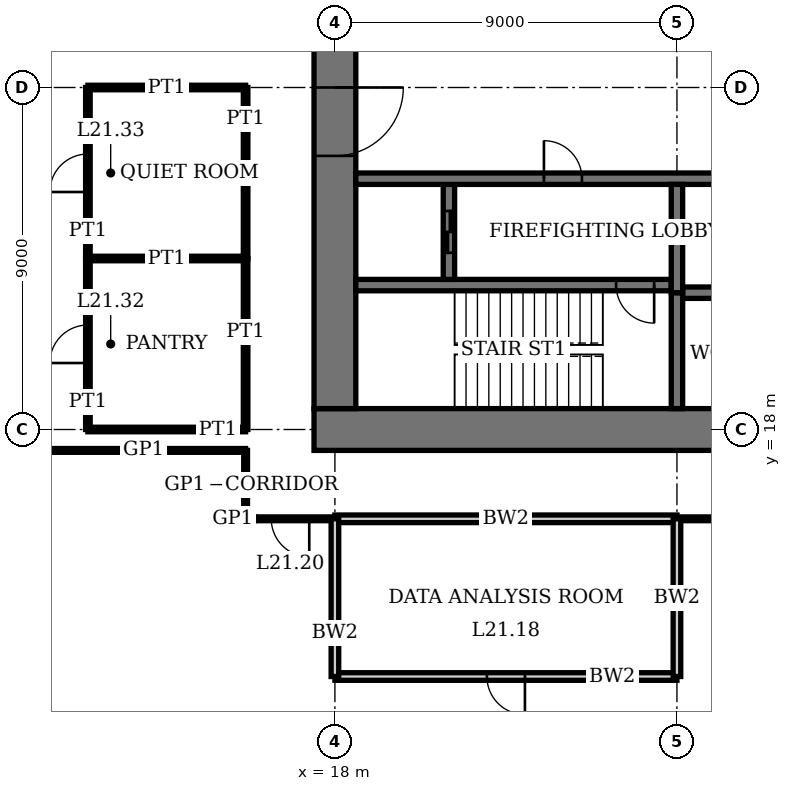
"""IFC4 building model, lengths in metres.
Left out: names, types, materials, properties, quantities, classifications, styles, units other than length and angle.
Written with IfcOpenShell. Run it as: python <this file> out.ifc"""

import sys

from ifc_helpers import new_model, si_unit, direction, frame, frame_2d, origin, place, context, subcontext, project, spatial, rectangle, extrude, element, fill, save


model = new_model("IFC4")
c1 = context("Model", 3, precision=1e-05, world=origin(), true_north=direction((0.0, 1.0)))
c2 = subcontext(c1, "Body", "Model", "MODEL_VIEW")
j1 = project(units=[si_unit("LENGTHUNIT", "METRE"), si_unit("PLANEANGLEUNIT", "RADIAN")], contexts=[c1])
p1 = place(None, origin())
s1 = spatial("IfcSite", under=j1, at=p1, CompositionType="ELEMENT")
p2 = place(p1, origin())
s2 = spatial("IfcBuilding", under=s1, at=p2, CompositionType="ELEMENT")
p3 = place(p2, frame((0.0, 0.0, 89.0)))
s3 = spatial("IfcBuildingStorey", under=s2, at=p3, CompositionType="ELEMENT", Elevation=89.0)
p4 = place(p3, frame((17.45, 18.0, 0.0), z_axis=(0.0, 0.0, 1.0), x_axis=(1.0, 0.0, 0.0)))
e1 = element("IfcWall", 1, at=p4, inside=s3, PredefinedType="SHEAR", context=c2, shape_type="SweptSolid", body=[
    extrude(rectangle(XDim=28.1, YDim=1.1, at=frame_2d((14.05, 0.0))), origin(), (0.0, 0.0, 1.0), 4.0),
])
p5 = place(p4, frame((11.55, 0.0, 0.0)))
e2 = element("IfcOpeningElement", 2, at=p5, cuts=e1, PredefinedType="OPENING", context=c2, shape_type="SweptSolid", body=[
    extrude(rectangle(XDim=1.0, YDim=2.4, at=frame_2d((0.5, 1.2))), frame((0.0, 0.56, 0.0), z_axis=(0.0, -1.0, 0.0), x_axis=(1.0, 0.0, 0.0)), (0.0, 0.0, 1.0), 1.12),
])
p6 = place(p4, frame((16.55, 0.0, 0.0)))
e3 = element("IfcOpeningElement", 3, at=p6, cuts=e1, PredefinedType="OPENING", context=c2, shape_type="SweptSolid", body=[
    extrude(rectangle(XDim=1.0, YDim=2.4, at=frame_2d((0.5, 1.2))), frame((0.0, 0.56, 0.0), z_axis=(0.0, -1.0, 0.0), x_axis=(1.0, 0.0, 0.0)), (0.0, 0.0, 1.0), 1.12),
])
p7 = place(p4, frame((20.0, 0.0, 0.0)))
e4 = element("IfcOpeningElement", 4, at=p7, cuts=e1, PredefinedType="OPENING", context=c2, shape_type="SweptSolid", body=[
    extrude(rectangle(XDim=1.1, YDim=2.4, at=frame_2d((0.55, 1.2))), frame((0.0, 0.56, 0.0), z_axis=(0.0, -1.0, 0.0), x_axis=(1.0, 0.0, 0.0)), (0.0, 0.0, 1.0), 1.12),
])
p8 = place(p4, frame((24.05, 0.0, 0.0)))
e5 = element("IfcOpeningElement", 5, at=p8, cuts=e1, PredefinedType="OPENING", context=c2, shape_type="SweptSolid", body=[
    extrude(rectangle(XDim=1.0, YDim=2.4, at=frame_2d((0.5, 1.2))), frame((0.0, 0.56, 0.0), z_axis=(0.0, -1.0, 0.0), x_axis=(1.0, 0.0, 0.0)), (0.0, 0.0, 1.0), 1.12),
])
p9 = place(p3, frame((18.0, 35.45, 0.0), z_axis=(0.0, 0.0, 1.0), x_axis=(0.0, -1.0, 0.0)))
e6 = element("IfcWall", 6, at=p9, inside=s3, PredefinedType="SHEAR", context=c2, shape_type="SweptSolid", body=[
    extrude(rectangle(XDim=16.9, YDim=1.1, at=frame_2d((8.45, 0.0))), origin(), (0.0, 0.0, 1.0), 4.0),
])
p10 = place(p9, frame((8.45, 0.0, 0.0)))
e7 = element("IfcOpeningElement", 7, at=p10, cuts=e6, PredefinedType="OPENING", context=c2, shape_type="SweptSolid", body=[
    extrude(rectangle(XDim=1.8, YDim=2.4, at=frame_2d((0.9, 1.2))), frame((0.0, 0.56, 0.0), z_axis=(0.0, -1.0, 0.0), x_axis=(1.0, 0.0, 0.0)), (0.0, 0.0, 1.0), 1.12),
])
p11 = place(p3, frame((18.55, 21.8, 0.0), z_axis=(0.0, 0.0, 1.0), x_axis=(1.0, 0.0, 0.0)))
e8 = element("IfcWall", 8, at=p11, inside=s3, PredefinedType="SHEAR", context=c2, shape_type="SweptSolid", body=[
    extrude(rectangle(XDim=8.3, YDim=0.3, at=frame_2d((4.15, 0.0))), origin(), (0.0, 0.0, 1.0), 4.0),
])
p12 = place(p11, frame((6.85, 0.0, 0.0)))
e9 = element("IfcOpeningElement", 9, at=p12, cuts=e8, PredefinedType="OPENING", context=c2, shape_type="SweptSolid", body=[
    extrude(rectangle(XDim=1.0, YDim=2.4, at=frame_2d((0.5, 1.2))), frame((0.0, 0.16, 0.0), z_axis=(0.0, -1.0, 0.0), x_axis=(1.0, 0.0, 0.0)), (0.0, 0.0, 1.0), 0.32),
])
p13 = place(p3, frame((27.0, 18.55, 0.0), z_axis=(0.0, 0.0, 1.0), x_axis=(0.0, 1.0, 0.0)))
e10 = element("IfcWall", 10, at=p13, inside=s3, PredefinedType="SHEAR", context=c2, shape_type="SweptSolid", body=[
    extrude(rectangle(XDim=3.05, YDim=0.3, at=frame_2d((1.525, 0.0))), origin(), (0.0, 0.0, 1.0), 4.0),
])
p14 = place(p3, frame((21.0, 21.95, 0.0), z_axis=(0.0, 0.0, 1.0), x_axis=(0.0, 1.0, 0.0)))
e11 = element("IfcWall", 11, at=p14, inside=s3, PredefinedType="SHEAR", context=c2, shape_type="SweptSolid", body=[
    extrude(rectangle(XDim=2.5, YDim=0.3, at=frame_2d((1.25, 0.0))), origin(), (0.0, 0.0, 1.0), 4.0),
])
p15 = place(p14, frame((0.7, 0.0, 0.0)))
e12 = element("IfcOpeningElement", 12, at=p15, cuts=e11, PredefinedType="OPENING", context=c2, shape_type="SweptSolid", body=[
    extrude(rectangle(XDim=1.1, YDim=2.4, at=frame_2d((0.55, 1.2))), frame((0.0, 0.16, 0.0), z_axis=(0.0, -1.0, 0.0), x_axis=(1.0, 0.0, 0.0)), (0.0, 0.0, 1.0), 0.32),
])
p16 = place(p3, frame((18.55, 24.6, 0.0), z_axis=(0.0, 0.0, 1.0), x_axis=(1.0, 0.0, 0.0)))
e13 = element("IfcWall", 13, at=p16, inside=s3, PredefinedType="SHEAR", context=c2, shape_type="SweptSolid", body=[
    extrude(rectangle(XDim=25.9, YDim=0.3, at=frame_2d((12.95, 0.0))), origin(), (0.0, 0.0, 1.0), 4.0),
])
p17 = place(p16, frame((4.95, 0.0, 0.0)))
e14 = element("IfcOpeningElement", 14, at=p17, cuts=e13, PredefinedType="OPENING", context=c2, shape_type="SweptSolid", body=[
    extrude(rectangle(XDim=1.0, YDim=2.4, at=frame_2d((0.5, 1.2))), frame((0.0, 0.16, 0.0), z_axis=(0.0, -1.0, 0.0), x_axis=(1.0, 0.0, 0.0)), (0.0, 0.0, 1.0), 0.32),
])
p18 = place(p16, frame((24.5, 0.0, 0.0)))
e15 = element("IfcOpeningElement", 15, at=p18, cuts=e13, PredefinedType="OPENING", context=c2, shape_type="SweptSolid", body=[
    extrude(rectangle(XDim=0.9, YDim=2.1, at=frame_2d((0.45, 1.05))), frame((0.0, 0.16, 0.0), z_axis=(0.0, -1.0, 0.0), x_axis=(1.0, 0.0, 0.0)), (0.0, 0.0, 1.0), 0.32),
])
p19 = place(p16, frame((21.3, 0.0, 0.0)))
e16 = element("IfcOpeningElement", 16, at=p19, cuts=e13, PredefinedType="OPENING", context=c2, shape_type="SweptSolid", body=[
    extrude(rectangle(XDim=1.3, YDim=2.4, at=frame_2d((0.65, 1.2))), frame((0.0, 0.16, 0.0), z_axis=(0.0, -1.0, 0.0), x_axis=(1.0, 0.0, 0.0)), (0.0, 0.0, 1.0), 0.32),
])
p20 = place(p3, frame((27.15, 21.6, 0.0), z_axis=(0.0, 0.0, 1.0), x_axis=(1.0, 0.0, 0.0)))
e17 = element("IfcWall", 17, at=p20, inside=s3, PredefinedType="SHEAR", context=c2, shape_type="SweptSolid", body=[
    extrude(rectangle(XDim=17.3, YDim=0.3, at=frame_2d((8.65, 0.0))), origin(), (0.0, 0.0, 1.0), 4.0),
])
p21 = place(p3, frame((27.0, 21.6, 0.0), z_axis=(0.0, 0.0, 1.0), x_axis=(0.0, 1.0, 0.0)))
e18 = element("IfcWall", 18, at=p21, inside=s3, PredefinedType="SHEAR", context=c2, shape_type="SweptSolid", body=[
    extrude(rectangle(XDim=2.85, YDim=0.3, at=frame_2d((1.425, 0.0))), origin(), (0.0, 0.0, 1.0), 4.0),
])
p22 = place(p3, frame((18.0, 11.5, 0.0), z_axis=(0.0, 0.0, 1.0), x_axis=(1.0, 0.0, 0.0)))
e19 = element("IfcWall", 19, at=p22, inside=s3, PredefinedType="SOLIDWALL", context=c2, shape_type="SweptSolid", body=[
    extrude(rectangle(XDim=9.0, YDim=0.2, at=frame_2d((4.5, 0.0))), origin(), (0.0, 0.0, 1.0), 3.75),
])
p23 = place(p22, frame((4.0, 0.0, 0.0)))
e20 = element("IfcOpeningElement", 20, at=p23, cuts=e19, PredefinedType="OPENING", context=c2, shape_type="SweptSolid", body=[
    extrude(rectangle(XDim=1.0, YDim=2.4, at=frame_2d((0.5, 1.2))), frame((0.0, 0.11, 0.0), z_axis=(0.0, -1.0, 0.0), x_axis=(1.0, 0.0, 0.0)), (0.0, 0.0, 1.0), 0.22),
])
p24 = place(p3, frame((18.0, 15.65, 0.0), z_axis=(0.0, 0.0, 1.0), x_axis=(1.0, 0.0, 0.0)))
e21 = element("IfcWall", 21, at=p24, inside=s3, PredefinedType="SOLIDWALL", context=c2, shape_type="SweptSolid", body=[
    extrude(rectangle(XDim=9.0, YDim=0.2, at=frame_2d((4.5, 0.0))), origin(), (0.0, 0.0, 1.0), 3.75),
])
p25 = place(p3, frame((15.65, 15.65, 0.0), z_axis=(0.0, 0.0, 1.0), x_axis=(1.0, 0.0, 0.0)))
e22 = element("IfcWall", 22, at=p25, inside=s3, PredefinedType="PARTITIONING", context=c2, shape_type="SweptSolid", body=[
    extrude(rectangle(XDim=2.35, YDim=0.1, at=frame_2d((1.175, 0.0))), origin(), (0.0, 0.0, 1.0), 3.75),
])
p26 = place(p25, frame((0.675, 0.0, 0.0)))
e23 = element("IfcOpeningElement", 23, at=p26, cuts=e22, PredefinedType="OPENING", context=c2, shape_type="SweptSolid", body=[
    extrude(rectangle(XDim=1.0, YDim=2.4, at=frame_2d((0.5, 1.2))), frame((0.0, 0.06, 0.0), z_axis=(0.0, -1.0, 0.0), x_axis=(1.0, 0.0, 0.0)), (0.0, 0.0, 1.0), 0.12),
])
p27 = place(p3, frame((27.0, 15.65, 0.0), z_axis=(0.0, 0.0, 1.0), x_axis=(1.0, 0.0, 0.0)))
e24 = element("IfcWall", 24, at=p27, inside=s3, PredefinedType="PARTITIONING", context=c2, shape_type="SweptSolid", body=[
    extrude(rectangle(XDim=9.0, YDim=0.1, at=frame_2d((4.5, 0.0))), origin(), (0.0, 0.0, 1.0), 3.75),
])
p28 = place(p27, frame((5.35, 0.0, 0.0)))
e25 = element("IfcOpeningElement", 25, at=p28, cuts=e24, PredefinedType="OPENING", context=c2, shape_type="SweptSolid", body=[
    extrude(rectangle(XDim=1.0, YDim=2.4, at=frame_2d((0.5, 1.2))), frame((0.0, 0.06, 0.0), z_axis=(0.0, -1.0, 0.0), x_axis=(1.0, 0.0, 0.0)), (0.0, 0.0, 1.0), 0.12),
])
p29 = place(p3, frame((10.075, 17.45, 0.0), z_axis=(0.0, 0.0, 1.0), x_axis=(1.0, 0.0, 0.0)))
e26 = element("IfcWall", 26, at=p29, inside=s3, PredefinedType="PARTITIONING", context=c2, shape_type="SweptSolid", body=[
    extrude(rectangle(XDim=5.575, YDim=0.1, at=frame_2d((2.788, 0.0))), origin(), (0.0, 0.0, 1.0), 3.75),
])
p30 = place(p3, frame((11.5, 18.0, 0.0), z_axis=(0.0, 0.0, 1.0), x_axis=(1.0, 0.0, 0.0)))
e27 = element("IfcWall", 27, at=p30, inside=s3, PredefinedType="PARTITIONING", context=c2, shape_type="SweptSolid", body=[
    extrude(rectangle(XDim=4.15, YDim=0.12, at=frame_2d((2.075, 0.0))), origin(), (0.0, 0.0, 1.0), 3.05),
])
p31 = place(p3, frame((11.5, 22.5, 0.0), z_axis=(0.0, 0.0, 1.0), x_axis=(1.0, 0.0, 0.0)))
e28 = element("IfcWall", 28, at=p31, inside=s3, PredefinedType="PARTITIONING", context=c2, shape_type="SweptSolid", body=[
    extrude(rectangle(XDim=4.15, YDim=0.12, at=frame_2d((2.075, 0.0))), origin(), (0.0, 0.0, 1.0), 3.1),
])
p32 = place(p3, frame((11.5, 27.0, 0.0), z_axis=(0.0, 0.0, 1.0), x_axis=(1.0, 0.0, 0.0)))
e29 = element("IfcWall", 29, at=p32, inside=s3, PredefinedType="PARTITIONING", context=c2, shape_type="SweptSolid", body=[
    extrude(rectangle(XDim=4.15, YDim=0.12, at=frame_2d((2.075, 0.0))), origin(), (0.0, 0.0, 1.0), 3.05),
])
p33 = place(p3, frame((11.5, 18.0, 0.0), z_axis=(0.0, 0.0, 1.0), x_axis=(0.0, 1.0, 0.0)))
e30 = element("IfcWall", 30, at=p33, inside=s3, PredefinedType="PARTITIONING", context=c2, shape_type="SweptSolid", body=[
    extrude(rectangle(XDim=4.5, YDim=0.12, at=frame_2d((2.25, 0.0))), origin(), (0.0, 0.0, 1.0), 3.75),
])
p34 = place(p33, frame((1.75, 0.0, 0.0)))
e31 = element("IfcOpeningElement", 31, at=p34, cuts=e30, PredefinedType="OPENING", context=c2, shape_type="SweptSolid", body=[
    extrude(rectangle(XDim=1.0, YDim=2.4, at=frame_2d((0.5, 1.2))), frame((0.0, 0.07, 0.0), z_axis=(0.0, -1.0, 0.0), x_axis=(1.0, 0.0, 0.0)), (0.0, 0.0, 1.0), 0.14),
])
p35 = place(p3, frame((11.5, 22.5, 0.0), z_axis=(0.0, 0.0, 1.0), x_axis=(0.0, 1.0, 0.0)))
e32 = element("IfcWall", 32, at=p35, inside=s3, PredefinedType="PARTITIONING", context=c2, shape_type="SweptSolid", body=[
    extrude(rectangle(XDim=4.5, YDim=0.12, at=frame_2d((2.25, 0.0))), origin(), (0.0, 0.0, 1.0), 3.75),
])
p36 = place(p35, frame((1.75, 0.0, 0.0)))
e33 = element("IfcOpeningElement", 33, at=p36, cuts=e32, PredefinedType="OPENING", context=c2, shape_type="SweptSolid", body=[
    extrude(rectangle(XDim=1.0, YDim=2.4, at=frame_2d((0.5, 1.2))), frame((0.0, 0.07, 0.0), z_axis=(0.0, -1.0, 0.0), x_axis=(1.0, 0.0, 0.0)), (0.0, 0.0, 1.0), 0.14),
])
for number, where, z_axis, x_axis in (
    (34, (15.65, 18.0, 0.0), (0.0, 0.0, 1.0), (0.0, 1.0, 0.0)),
    (35, (15.65, 22.5, 0.0), (0.0, 0.0, 1.0), (0.0, 1.0, 0.0)),
):
    element("IfcWall", number, at=place(p3, frame(where, z_axis=z_axis, x_axis=x_axis)), inside=s3, PredefinedType="PARTITIONING", context=c2, shape_type="SweptSolid", body=[
        extrude(rectangle(XDim=4.5, YDim=0.12, at=frame_2d((2.25, 0.0))), origin(), (0.0, 0.0, 1.0), 3.75),
    ])
p37 = place(p3, frame((15.65, 15.65, 0.0), z_axis=(0.0, 0.0, 1.0), x_axis=(0.0, 1.0, 0.0)))
e36 = element("IfcWall", 36, at=p37, inside=s3, PredefinedType="PARTITIONING", context=c2, shape_type="SweptSolid", body=[
    extrude(rectangle(XDim=1.8, YDim=0.1, at=frame_2d((0.9, 0.0))), origin(), (0.0, 0.0, 1.0), 3.75),
])
for number, where, z_axis, x_axis in (
    (37, (18.0, 11.5, 0.0), (0.0, 0.0, 1.0), (0.0, 1.0, 0.0)),
    (38, (27.0, 11.5, 0.0), (0.0, 0.0, 1.0), (0.0, 1.0, 0.0)),
):
    element("IfcWall", number, at=place(p3, frame(where, z_axis=z_axis, x_axis=x_axis)), inside=s3, PredefinedType="SOLIDWALL", context=c2, shape_type="SweptSolid", body=[
        extrude(rectangle(XDim=4.15, YDim=0.2, at=frame_2d((2.075, 0.0))), origin(), (0.0, 0.0, 1.0), 3.05),
    ])
p38 = place(p10, origin())
e39 = element("IfcDoor", 39, at=p38, inside=s3, OperationType="DOUBLE_DOOR_DOUBLE_SWING", PredefinedType="DOOR", context=c2, shape_type="SweptSolid", body=[
    extrude(rectangle(XDim=1.8, YDim=2.4, at=frame_2d((0.9, 1.2))), frame((0.0, 0.03, 0.0), z_axis=(0.0, -1.0, 0.0), x_axis=(1.0, 0.0, 0.0)), (0.0, 0.0, 1.0), 0.06),
    extrude(rectangle(XDim=0.04, YDim=2.4, at=frame_2d((0.02, 1.2))), frame((0.0, 0.55, 0.0), z_axis=(0.0, -1.0, 0.0), x_axis=(1.0, 0.0, 0.0)), (0.0, 0.0, 1.0), 1.1),
    extrude(rectangle(XDim=0.04, YDim=2.4, at=frame_2d((1.78, 1.2))), frame((0.0, 0.55, 0.0), z_axis=(0.0, -1.0, 0.0), x_axis=(1.0, 0.0, 0.0)), (0.0, 0.0, 1.0), 1.1),
    extrude(rectangle(XDim=1.8, YDim=0.04, at=frame_2d((0.9, 2.38))), frame((0.0, 0.55, 0.0), z_axis=(0.0, -1.0, 0.0), x_axis=(1.0, 0.0, 0.0)), (0.0, 0.0, 1.0), 1.1),
])
fill(e7, e39)
p39 = place(p12, origin())
e40 = element("IfcDoor", 40, at=p39, inside=s3, OperationType="SINGLE_SWING_RIGHT", PredefinedType="DOOR", context=c2, shape_type="SweptSolid", body=[
    extrude(rectangle(XDim=1.0, YDim=2.4, at=frame_2d((0.5, 1.2))), frame((0.0, 0.03, 0.0), z_axis=(0.0, -1.0, 0.0), x_axis=(1.0, 0.0, 0.0)), (0.0, 0.0, 1.0), 0.06),
])
fill(e9, e40)
p40 = place(p17, origin())
e41 = element("IfcDoor", 41, at=p40, inside=s3, OperationType="SINGLE_SWING_RIGHT", PredefinedType="DOOR", context=c2, shape_type="SweptSolid", body=[
    extrude(rectangle(XDim=1.0, YDim=2.4, at=frame_2d((0.5, 1.2))), frame((0.0, 0.03, 0.0), z_axis=(0.0, -1.0, 0.0), x_axis=(1.0, 0.0, 0.0)), (0.0, 0.0, 1.0), 0.06),
])
fill(e14, e41)
p41 = place(p23, origin())
e42 = element("IfcDoor", 42, at=p41, inside=s3, OperationType="SINGLE_SWING_RIGHT", PredefinedType="DOOR", context=c2, shape_type="SweptSolid", body=[
    extrude(rectangle(XDim=1.0, YDim=2.4, at=frame_2d((0.5, 1.2))), frame((0.0, 0.035, 0.0), z_axis=(0.0, -1.0, 0.0), x_axis=(1.0, 0.0, 0.0)), (0.0, 0.0, 1.0), 0.07),
])
fill(e20, e42)
p42 = place(p26, origin())
e43 = element("IfcDoor", 43, at=p42, inside=s3, OperationType="SINGLE_SWING_RIGHT", PredefinedType="DOOR", context=c2, shape_type="SweptSolid", body=[
    extrude(rectangle(XDim=1.0, YDim=2.4, at=frame_2d((0.5, 1.2))), frame((0.0, 0.02, 0.0), z_axis=(0.0, -1.0, 0.0), x_axis=(1.0, 0.0, 0.0)), (0.0, 0.0, 1.0), 0.04),
])
fill(e23, e43)
p43 = place(p34, origin())
e44 = element("IfcDoor", 44, at=p43, inside=s3, OperationType="SINGLE_SWING_RIGHT", PredefinedType="DOOR", context=c2, shape_type="SweptSolid", body=[
    extrude(rectangle(XDim=1.0, YDim=2.4, at=frame_2d((0.5, 1.2))), frame((0.0, 0.025, 0.0), z_axis=(0.0, -1.0, 0.0), x_axis=(1.0, 0.0, 0.0)), (0.0, 0.0, 1.0), 0.05),
])
fill(e31, e44)
p44 = place(p36, origin())
e45 = element("IfcDoor", 45, at=p44, inside=s3, OperationType="SINGLE_SWING_RIGHT", PredefinedType="DOOR", context=c2, shape_type="SweptSolid", body=[
    extrude(rectangle(XDim=1.0, YDim=2.4, at=frame_2d((0.5, 1.2))), frame((0.0, 0.025, 0.0), z_axis=(0.0, -1.0, 0.0), x_axis=(1.0, 0.0, 0.0)), (0.0, 0.0, 1.0), 0.05),
])
fill(e33, e45)
p45 = place(p15, origin())
e46 = element("IfcDoor", 46, at=p45, inside=s3, OperationType="DOUBLE_DOOR_SLIDING", PredefinedType="DOOR", context=c2, shape_type="SweptSolid", body=[
    extrude(rectangle(XDim=1.1, YDim=2.4, at=frame_2d((0.55, 1.2))), frame((0.0, 0.03, 0.0), z_axis=(0.0, -1.0, 0.0), x_axis=(1.0, 0.0, 0.0)), (0.0, 0.0, 1.0), 0.06),
])
fill(e12, e46)
save(model, sys.argv[1])
